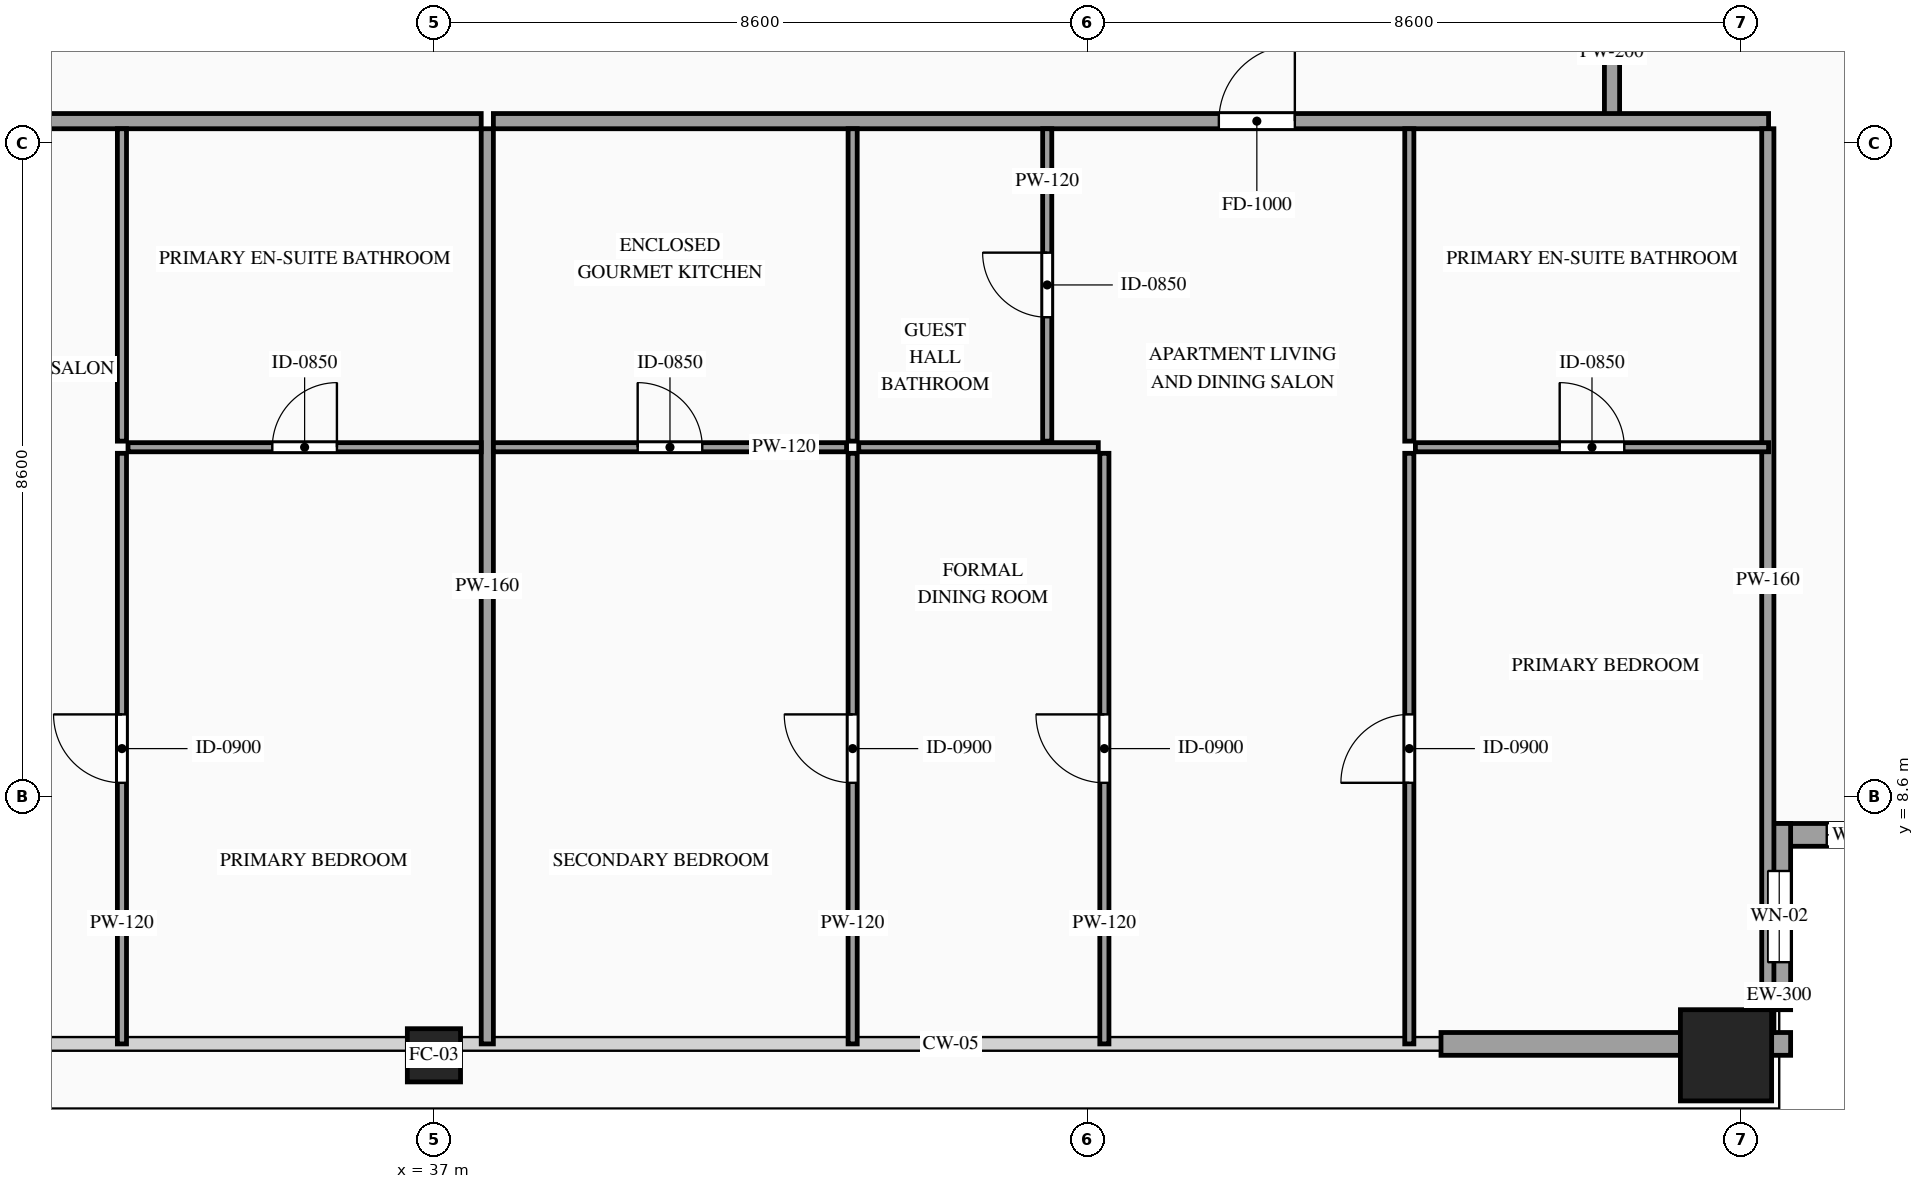
"""IFC4 building model, lengths in metres.
Left out: names, types, materials, properties, quantities, classifications, styles, units other than length and angle.
Written with IfcOpenShell. Run it as: python <this file> out.ifc"""

import sys

from ifc_helpers import new_model, si_unit, direction, frame, frame_2d, origin, origin_2d, place, context, subcontext, project, spatial, rectangle, hollow_rectangle, extrude, source, transform, mapped, element, fill, save


model = new_model("IFC4")
c1 = context("Model", 3, precision=1e-05, world=origin(), true_north=direction((0.0, 1.0)))
c2 = subcontext(c1, "Body", "Model", "MODEL_VIEW")
j1 = project(units=[si_unit("LENGTHUNIT", "METRE"), si_unit("PLANEANGLEUNIT", "RADIAN")], contexts=[c1])
p1 = place(None, origin())
s1 = spatial("IfcSite", under=j1, at=p1, CompositionType="ELEMENT")
p2 = place(p1, origin())
s2 = spatial("IfcBuilding", under=s1, at=p2, CompositionType="ELEMENT")
p3 = place(p2, frame((0.0, 0.0, 282.1)))
s3 = spatial("IfcBuildingStorey", under=s2, at=p3, CompositionType="ELEMENT", Elevation=282.1)
m1 = source(origin(), c2, "Body", "SweptSolid", [
    extrude(hollow_rectangle(XDim=0.7, YDim=0.7, WallThickness=0.032, at=origin_2d()), origin(), (0.0, 0.0, 1.0), 3.28),
])
p4 = place(p3, frame((37.0, 5.2, 0.0), z_axis=(0.0, 0.0, 1.0), x_axis=(1.0, 0.0, 0.0)))
e1 = element("IfcColumn", 1, at=p4, inside=s3, PredefinedType="COLUMN", context=c2, shape_type="MappedRepresentation", body=[
    mapped(m1, transform((0.0, 0.0, 0.0), scale=1.0)),
])
m2 = source(origin(), c2, "Body", "SweptSolid", [
    extrude(hollow_rectangle(XDim=1.2, YDim=1.2, WallThickness=0.055, at=origin_2d()), origin(), (0.0, 0.0, 1.0), 3.28),
])
p5 = place(p3, frame((54.0, 5.2, 0.0), z_axis=(0.0, 0.0, 1.0), x_axis=(1.0, 0.0, 0.0)))
e2 = element("IfcColumn", 2, at=p5, inside=s3, PredefinedType="COLUMN", context=c2, shape_type="MappedRepresentation", body=[
    mapped(m2, transform((0.0, 0.0, 0.0), scale=1.0)),
])
p6 = place(p3, frame((54.55, 8.1, 0.0), z_axis=(0.0, 0.0, 1.0), x_axis=(1.0, 0.0, 0.0)))
e3 = element("IfcWall", 3, at=p6, inside=s3, PredefinedType="SOLIDWALL", context=c2, shape_type="SweptSolid", body=[
    extrude(rectangle(XDim=2.45, YDim=0.3, at=frame_2d((1.225, 0.0))), origin(), (0.0, 0.0, 1.0), 3.28),
])
p7 = place(p6, frame((0.775, 0.0, 0.85)))
e4 = element("IfcOpeningElement", 4, at=p7, cuts=e3, PredefinedType="OPENING", context=c2, shape_type="SweptSolid", body=[
    extrude(rectangle(XDim=0.9, YDim=1.5, at=frame_2d((0.45, 0.75))), frame((0.0, 0.165, 0.0), z_axis=(0.0, -1.0, 0.0), x_axis=(1.0, 0.0, 0.0)), (0.0, 0.0, 1.0), 0.33),
])
p8 = place(p3, frame((54.7, 5.8, 0.0), z_axis=(0.0, 0.0, 1.0), x_axis=(0.0, 1.0, 0.0)))
e5 = element("IfcWall", 5, at=p8, inside=s3, PredefinedType="SOLIDWALL", context=c2, shape_type="SweptSolid", body=[
    extrude(rectangle(XDim=2.45, YDim=0.3, at=frame_2d((1.225, 0.0))), origin(), (0.0, 0.0, 1.0), 3.28),
])
p9 = place(p8, frame((0.625, 0.0, 0.85)))
e6 = element("IfcOpeningElement", 6, at=p9, cuts=e5, PredefinedType="OPENING", context=c2, shape_type="SweptSolid", body=[
    extrude(rectangle(XDim=1.2, YDim=2.1, at=frame_2d((0.6, 1.05))), frame((0.0, 0.165, 0.0), z_axis=(0.0, -1.0, 0.0), x_axis=(1.0, 0.0, 0.0)), (0.0, 0.0, 1.0), 0.33),
])
m3 = source(origin(), c2, "Body", "SweptSolid", [
    extrude(rectangle(XDim=0.25, YDim=0.3, at=frame_2d((0.125, 0.0))), origin(), (0.0, 0.0, 1.0), 3.28),
])
p10 = place(p3, frame((54.6, 5.35, 0.0), z_axis=(0.0, 0.0, 1.0), x_axis=(1.0, 0.0, 0.0)))
e7 = element("IfcWall", 7, at=p10, inside=s3, PredefinedType="SOLIDWALL", context=c2, shape_type="MappedRepresentation", body=[
    mapped(m3, transform((0.0, 0.0, 0.0), scale=1.0)),
])
m4 = source(origin(), c2, "Body", "SweptSolid", [
    extrude(rectangle(XDim=3.15, YDim=0.3, at=frame_2d((1.575, 0.0))), origin(), (0.0, 0.0, 1.0), 2.835),
])
p11 = place(p3, frame((50.25, 5.35, 0.0), z_axis=(0.0, 0.0, 1.0), x_axis=(1.0, 0.0, 0.0)))
e8 = element("IfcWall", 8, at=p11, inside=s3, PredefinedType="SOLIDWALL", context=c2, shape_type="MappedRepresentation", body=[
    mapped(m4, transform((0.0, 0.0, 0.0), scale=1.0)),
])
m5 = source(origin(), c2, "Body", "SweptSolid", [
    extrude(rectangle(XDim=1.7, YDim=0.2, at=frame_2d((0.85, 0.0))), origin(), (0.0, 0.0, 1.0), 3.28),
])
p12 = place(p3, frame((52.5, 17.55, 0.0), z_axis=(0.0, 0.0, 1.0), x_axis=(0.0, 1.0, 0.0)))
e9 = element("IfcWall", 9, at=p12, inside=s3, PredefinedType="PARTITIONING", context=c2, shape_type="MappedRepresentation", body=[
    mapped(m5, transform((0.0, 0.0, 0.0), scale=1.0)),
])
p13 = place(p3, frame((19.44, 17.49, 0.0), z_axis=(0.0, 0.0, 1.0), x_axis=(1.0, 0.0, 0.0)))
e10 = element("IfcWall", 10, at=p13, inside=s3, PredefinedType="PARTITIONING", context=c2, shape_type="SweptSolid", body=[
    extrude(rectangle(XDim=18.182, YDim=0.2, at=frame_2d((9.091, 0.0))), origin(), (0.0, 0.0, 1.0), 3.28),
])
p14 = place(p13, frame((10.528, 0.0, 0.0)))
e11 = element("IfcOpeningElement", 11, at=p14, cuts=e10, PredefinedType="OPENING", context=c2, shape_type="SweptSolid", body=[
    extrude(rectangle(XDim=1.0, YDim=2.2, at=frame_2d((0.5, 1.1))), frame((0.0, 0.115, 0.0), z_axis=(0.0, -1.0, 0.0), x_axis=(1.0, 0.0, 0.0)), (0.0, 0.0, 1.0), 0.23),
])
m6 = source(origin(), c2, "Body", "SweptSolid", [
    extrude(rectangle(XDim=12.04, YDim=0.16, at=frame_2d((6.02, 0.0))), origin(), (0.0, 0.0, 1.0), 3.28),
])
p15 = place(p3, frame((37.702, 5.35, 0.0), z_axis=(0.0, 0.0, 1.0), x_axis=(0.0, 1.0, 0.0)))
e12 = element("IfcWall", 12, at=p15, inside=s3, PredefinedType="PARTITIONING", context=c2, shape_type="MappedRepresentation", body=[
    mapped(m6, transform((0.0, 0.0, 0.0), scale=1.0)),
])
p16 = place(p3, frame((32.975, 13.2, 0.0), z_axis=(0.0, 0.0, 1.0), x_axis=(1.0, 0.0, 0.0)))
e13 = element("IfcWall", 13, at=p16, inside=s3, PredefinedType="PARTITIONING", context=c2, shape_type="SweptSolid", body=[
    extrude(rectangle(XDim=4.647, YDim=0.12, at=frame_2d((2.323, 0.0))), origin(), (0.0, 0.0, 1.0), 3.28),
])
p17 = place(p16, frame((1.898, 0.0, 0.0)))
e14 = element("IfcOpeningElement", 14, at=p17, cuts=e13, PredefinedType="OPENING", context=c2, shape_type="SweptSolid", body=[
    extrude(rectangle(XDim=0.85, YDim=2.1, at=frame_2d((0.425, 1.05))), frame((0.0, 0.075, 0.0), z_axis=(0.0, -1.0, 0.0), x_axis=(1.0, 0.0, 0.0)), (0.0, 0.0, 1.0), 0.15),
])
m7 = source(origin(), c2, "Body", "SweptSolid", [
    extrude(rectangle(XDim=4.11, YDim=0.12, at=frame_2d((2.055, 0.0))), origin(), (0.0, 0.0, 1.0), 3.28),
])
p18 = place(p3, frame((32.895, 13.28, 0.0), z_axis=(0.0, 0.0, 1.0), x_axis=(0.0, 1.0, 0.0)))
e15 = element("IfcWall", 15, at=p18, inside=s3, PredefinedType="PARTITIONING", context=c2, shape_type="MappedRepresentation", body=[
    mapped(m7, transform((0.0, 0.0, 0.0), scale=1.0)),
])
p19 = place(p3, frame((32.895, 5.35, 0.0), z_axis=(0.0, 0.0, 1.0), x_axis=(0.0, 1.0, 0.0)))
e16 = element("IfcWall", 16, at=p19, inside=s3, PredefinedType="PARTITIONING", context=c2, shape_type="SweptSolid", body=[
    extrude(rectangle(XDim=7.77, YDim=0.12, at=frame_2d((3.885, 0.0))), origin(), (0.0, 0.0, 1.0), 3.28),
])
p20 = place(p19, frame((3.435, 0.0, 0.0)))
e17 = element("IfcOpeningElement", 17, at=p20, cuts=e16, PredefinedType="OPENING", context=c2, shape_type="SweptSolid", body=[
    extrude(rectangle(XDim=0.9, YDim=2.15, at=frame_2d((0.45, 1.075))), frame((0.0, 0.075, 0.0), z_axis=(0.0, -1.0, 0.0), x_axis=(1.0, 0.0, 0.0)), (0.0, 0.0, 1.0), 0.15),
])
p21 = place(p3, frame((37.782, 17.49, 0.0), z_axis=(0.0, 0.0, 1.0), x_axis=(1.0, 0.0, 0.0)))
e18 = element("IfcWall", 18, at=p21, inside=s3, PredefinedType="PARTITIONING", context=c2, shape_type="SweptSolid", body=[
    extrude(rectangle(XDim=16.778, YDim=0.2, at=frame_2d((8.389, 0.0))), origin(), (0.0, 0.0, 1.0), 3.28),
])
p22 = place(p21, frame((9.545, 0.0, 0.0)))
e19 = element("IfcOpeningElement", 19, at=p22, cuts=e18, PredefinedType="OPENING", context=c2, shape_type="SweptSolid", body=[
    extrude(rectangle(XDim=1.0, YDim=2.2, at=frame_2d((0.5, 1.1))), frame((0.0, 0.115, 0.0), z_axis=(0.0, -1.0, 0.0), x_axis=(1.0, 0.0, 0.0)), (0.0, 0.0, 1.0), 0.23),
])
m8 = source(origin(), c2, "Body", "SweptSolid", [
    extrude(rectangle(XDim=11.89, YDim=0.16, at=frame_2d((5.945, 0.0))), origin(), (0.0, 0.0, 1.0), 3.28),
])
p23 = place(p3, frame((54.55, 5.5, 0.0), z_axis=(0.0, 0.0, 1.0), x_axis=(0.0, 1.0, 0.0)))
e20 = element("IfcWall", 20, at=p23, inside=s3, PredefinedType="PARTITIONING", context=c2, shape_type="MappedRepresentation", body=[
    mapped(m8, transform((0.0, 0.0, 0.0), scale=1.0)),
])
p24 = place(p3, frame((37.782, 13.2, 0.0), z_axis=(0.0, 0.0, 1.0), x_axis=(1.0, 0.0, 0.0)))
e21 = element("IfcWall", 21, at=p24, inside=s3, PredefinedType="PARTITIONING", context=c2, shape_type="SweptSolid", body=[
    extrude(rectangle(XDim=4.647, YDim=0.12, at=frame_2d((2.323, 0.0))), origin(), (0.0, 0.0, 1.0), 3.28),
])
p25 = place(p24, frame((1.898, 0.0, 0.0)))
e22 = element("IfcOpeningElement", 22, at=p25, cuts=e21, PredefinedType="OPENING", context=c2, shape_type="SweptSolid", body=[
    extrude(rectangle(XDim=0.85, YDim=2.1, at=frame_2d((0.425, 1.05))), frame((0.0, 0.075, 0.0), z_axis=(0.0, -1.0, 0.0), x_axis=(1.0, 0.0, 0.0)), (0.0, 0.0, 1.0), 0.15),
])
p26 = place(p3, frame((42.509, 13.28, 0.0), z_axis=(0.0, 0.0, 1.0), x_axis=(0.0, 1.0, 0.0)))
e23 = element("IfcWall", 23, at=p26, inside=s3, PredefinedType="PARTITIONING", context=c2, shape_type="MappedRepresentation", body=[
    mapped(m7, transform((0.0, 0.0, 0.0), scale=1.0)),
])
p27 = place(p3, frame((45.069, 13.28, 0.0), z_axis=(0.0, 0.0, 1.0), x_axis=(0.0, 1.0, 0.0)))
e24 = element("IfcWall", 24, at=p27, inside=s3, PredefinedType="PARTITIONING", context=c2, shape_type="SweptSolid", body=[
    extrude(rectangle(XDim=4.11, YDim=0.12, at=frame_2d((2.055, 0.0))), origin(), (0.0, 0.0, 1.0), 3.28),
])
p28 = place(p27, frame((1.63, 0.0, 0.0)))
e25 = element("IfcOpeningElement", 25, at=p28, cuts=e24, PredefinedType="OPENING", context=c2, shape_type="SweptSolid", body=[
    extrude(rectangle(XDim=0.85, YDim=2.1, at=frame_2d((0.425, 1.05))), frame((0.0, 0.075, 0.0), z_axis=(0.0, -1.0, 0.0), x_axis=(1.0, 0.0, 0.0)), (0.0, 0.0, 1.0), 0.15),
])
p29 = place(p3, frame((49.913, 13.2, 0.0), z_axis=(0.0, 0.0, 1.0), x_axis=(1.0, 0.0, 0.0)))
e26 = element("IfcWall", 26, at=p29, inside=s3, PredefinedType="PARTITIONING", context=c2, shape_type="SweptSolid", body=[
    extrude(rectangle(XDim=4.647, YDim=0.12, at=frame_2d((2.323, 0.0))), origin(), (0.0, 0.0, 1.0), 3.28),
])
p30 = place(p29, frame((1.898, 0.0, 0.0)))
e27 = element("IfcOpeningElement", 27, at=p30, cuts=e26, PredefinedType="OPENING", context=c2, shape_type="SweptSolid", body=[
    extrude(rectangle(XDim=0.85, YDim=2.1, at=frame_2d((0.425, 1.05))), frame((0.0, 0.075, 0.0), z_axis=(0.0, -1.0, 0.0), x_axis=(1.0, 0.0, 0.0)), (0.0, 0.0, 1.0), 0.15),
])
p31 = place(p3, frame((49.833, 13.28, 0.0), z_axis=(0.0, 0.0, 1.0), x_axis=(0.0, 1.0, 0.0)))
e28 = element("IfcWall", 28, at=p31, inside=s3, PredefinedType="PARTITIONING", context=c2, shape_type="MappedRepresentation", body=[
    mapped(m7, transform((0.0, 0.0, 0.0), scale=1.0)),
])
p32 = place(p3, frame((42.509, 5.35, 0.0), z_axis=(0.0, 0.0, 1.0), x_axis=(0.0, 1.0, 0.0)))
e29 = element("IfcWall", 29, at=p32, inside=s3, PredefinedType="PARTITIONING", context=c2, shape_type="SweptSolid", body=[
    extrude(rectangle(XDim=7.77, YDim=0.12, at=frame_2d((3.885, 0.0))), origin(), (0.0, 0.0, 1.0), 3.28),
])
p33 = place(p32, frame((3.435, 0.0, 0.0)))
e30 = element("IfcOpeningElement", 30, at=p33, cuts=e29, PredefinedType="OPENING", context=c2, shape_type="SweptSolid", body=[
    extrude(rectangle(XDim=0.9, YDim=2.15, at=frame_2d((0.45, 1.075))), frame((0.0, 0.075, 0.0), z_axis=(0.0, -1.0, 0.0), x_axis=(1.0, 0.0, 0.0)), (0.0, 0.0, 1.0), 0.15),
])
p34 = place(p3, frame((49.833, 5.35, 0.0), z_axis=(0.0, 0.0, 1.0), x_axis=(0.0, 1.0, 0.0)))
e31 = element("IfcWall", 31, at=p34, inside=s3, PredefinedType="PARTITIONING", context=c2, shape_type="SweptSolid", body=[
    extrude(rectangle(XDim=7.77, YDim=0.12, at=frame_2d((3.885, 0.0))), origin(), (0.0, 0.0, 1.0), 3.28),
])
p35 = place(p34, frame((3.435, 0.0, 0.0)))
e32 = element("IfcOpeningElement", 32, at=p35, cuts=e31, PredefinedType="OPENING", context=c2, shape_type="SweptSolid", body=[
    extrude(rectangle(XDim=0.9, YDim=2.15, at=frame_2d((0.45, 1.075))), frame((0.0, 0.075, 0.0), z_axis=(0.0, -1.0, 0.0), x_axis=(1.0, 0.0, 0.0)), (0.0, 0.0, 1.0), 0.15),
])
m9 = source(origin(), c2, "Body", "SweptSolid", [
    extrude(rectangle(XDim=3.152, YDim=0.12, at=frame_2d((1.576, 0.0))), origin(), (0.0, 0.0, 1.0), 3.28),
])
p36 = place(p3, frame((42.589, 13.2, 0.0), z_axis=(0.0, 0.0, 1.0), x_axis=(1.0, 0.0, 0.0)))
e33 = element("IfcWall", 33, at=p36, inside=s3, PredefinedType="PARTITIONING", context=c2, shape_type="MappedRepresentation", body=[
    mapped(m9, transform((0.0, 0.0, 0.0), scale=1.0)),
])
p37 = place(p3, frame((45.821, 5.35, 0.0), z_axis=(0.0, 0.0, 1.0), x_axis=(0.0, 1.0, 0.0)))
e34 = element("IfcWall", 34, at=p37, inside=s3, PredefinedType="PARTITIONING", context=c2, shape_type="SweptSolid", body=[
    extrude(rectangle(XDim=7.77, YDim=0.12, at=frame_2d((3.885, 0.0))), origin(), (0.0, 0.0, 1.0), 3.28),
])
p38 = place(p37, frame((3.435, 0.0, 0.0)))
e35 = element("IfcOpeningElement", 35, at=p38, cuts=e34, PredefinedType="OPENING", context=c2, shape_type="SweptSolid", body=[
    extrude(rectangle(XDim=0.9, YDim=2.15, at=frame_2d((0.45, 1.075))), frame((0.0, 0.075, 0.0), z_axis=(0.0, -1.0, 0.0), x_axis=(1.0, 0.0, 0.0)), (0.0, 0.0, 1.0), 0.15),
])
m10 = source(origin(), c2, "Body", "SweptSolid", [
    extrude(rectangle(XDim=0.9, YDim=1.5, at=frame_2d((0.45, 0.75))), frame((0.0, 0.03, 0.0), z_axis=(0.0, -1.0, 0.0), x_axis=(1.0, 0.0, 0.0)), (0.0, 0.0, 1.0), 0.06),
])
p39 = place(p7, origin())
e36 = element("IfcWindow", 36, at=p39, inside=s3, PartitioningType="SINGLE_PANEL", PredefinedType="WINDOW", context=c2, shape_type="MappedRepresentation", body=[
    mapped(m10, transform((0.0, 0.0, 0.0), scale=1.0)),
])
fill(e4, e36)
m11 = source(origin(), c2, "Body", "SweptSolid", [
    extrude(rectangle(XDim=1.2, YDim=2.1, at=frame_2d((0.6, 1.05))), frame((0.0, 0.03, 0.0), z_axis=(0.0, -1.0, 0.0), x_axis=(1.0, 0.0, 0.0)), (0.0, 0.0, 1.0), 0.06),
])
p40 = place(p9, origin())
e37 = element("IfcWindow", 37, at=p40, inside=s3, PartitioningType="SINGLE_PANEL", PredefinedType="WINDOW", context=c2, shape_type="MappedRepresentation", body=[
    mapped(m11, transform((0.0, 0.0, 0.0), scale=1.0)),
])
fill(e6, e37)
m12 = source(origin(), c2, "Body", "SweptSolid", [
    extrude(rectangle(XDim=0.85, YDim=2.1, at=frame_2d((0.425, 1.05))), frame((0.0, 0.025, 0.0), z_axis=(0.0, -1.0, 0.0), x_axis=(1.0, 0.0, 0.0)), (0.0, 0.0, 1.0), 0.05),
])
p41 = place(p17, origin())
e38 = element("IfcDoor", 38, at=p41, inside=s3, OperationType="SINGLE_SWING_RIGHT", PredefinedType="DOOR", context=c2, shape_type="MappedRepresentation", body=[
    mapped(m12, transform((0.0, 0.0, 0.0), scale=1.0)),
])
fill(e14, e38)
m13 = source(origin(), c2, "Body", "SweptSolid", [
    extrude(rectangle(XDim=0.9, YDim=2.15, at=frame_2d((0.45, 1.075))), frame((0.0, 0.025, 0.0), z_axis=(0.0, -1.0, 0.0), x_axis=(1.0, 0.0, 0.0)), (0.0, 0.0, 1.0), 0.05),
])
p42 = place(p20, origin())
e39 = element("IfcDoor", 39, at=p42, inside=s3, OperationType="SINGLE_SWING_RIGHT", PredefinedType="DOOR", context=c2, shape_type="MappedRepresentation", body=[
    mapped(m13, transform((0.0, 0.0, 0.0), scale=1.0)),
])
fill(e17, e39)
m14 = source(origin(), c2, "Body", "SweptSolid", [
    extrude(rectangle(XDim=1.0, YDim=2.2, at=frame_2d((0.5, 1.1))), frame((0.0, 0.025, 0.0), z_axis=(0.0, -1.0, 0.0), x_axis=(1.0, 0.0, 0.0)), (0.0, 0.0, 1.0), 0.05),
])
p43 = place(p22, origin())
e40 = element("IfcDoor", 40, at=p43, inside=s3, OperationType="SINGLE_SWING_RIGHT", PredefinedType="DOOR", context=c2, shape_type="MappedRepresentation", body=[
    mapped(m14, transform((0.0, 0.0, 0.0), scale=1.0)),
])
fill(e19, e40)
p44 = place(p25, origin())
e41 = element("IfcDoor", 41, at=p44, inside=s3, OperationType="SINGLE_SWING_LEFT", PredefinedType="DOOR", context=c2, shape_type="MappedRepresentation", body=[
    mapped(m12, transform((0.0, 0.0, 0.0), scale=1.0)),
])
fill(e22, e41)
p45 = place(p28, origin())
e42 = element("IfcDoor", 42, at=p45, inside=s3, OperationType="SINGLE_SWING_RIGHT", PredefinedType="DOOR", context=c2, shape_type="MappedRepresentation", body=[
    mapped(m12, transform((0.0, 0.0, 0.0), scale=1.0)),
])
fill(e25, e42)
p46 = place(p30, origin())
e43 = element("IfcDoor", 43, at=p46, inside=s3, OperationType="SINGLE_SWING_LEFT", PredefinedType="DOOR", context=c2, shape_type="MappedRepresentation", body=[
    mapped(m12, transform((0.0, 0.0, 0.0), scale=1.0)),
])
fill(e27, e43)
p47 = place(p33, origin())
e44 = element("IfcDoor", 44, at=p47, inside=s3, OperationType="SINGLE_SWING_RIGHT", PredefinedType="DOOR", context=c2, shape_type="MappedRepresentation", body=[
    mapped(m13, transform((0.0, 0.0, 0.0), scale=1.0)),
])
fill(e30, e44)
p48 = place(p35, origin())
e45 = element("IfcDoor", 45, at=p48, inside=s3, OperationType="SINGLE_SWING_LEFT", PredefinedType="DOOR", context=c2, shape_type="MappedRepresentation", body=[
    mapped(m13, transform((0.0, 0.0, 0.0), scale=1.0)),
])
fill(e32, e45)
p49 = place(p38, origin())
e46 = element("IfcDoor", 46, at=p49, inside=s3, OperationType="SINGLE_SWING_RIGHT", PredefinedType="DOOR", context=c2, shape_type="MappedRepresentation", body=[
    mapped(m13, transform((0.0, 0.0, 0.0), scale=1.0)),
])
fill(e35, e46)
save(model, sys.argv[1])
